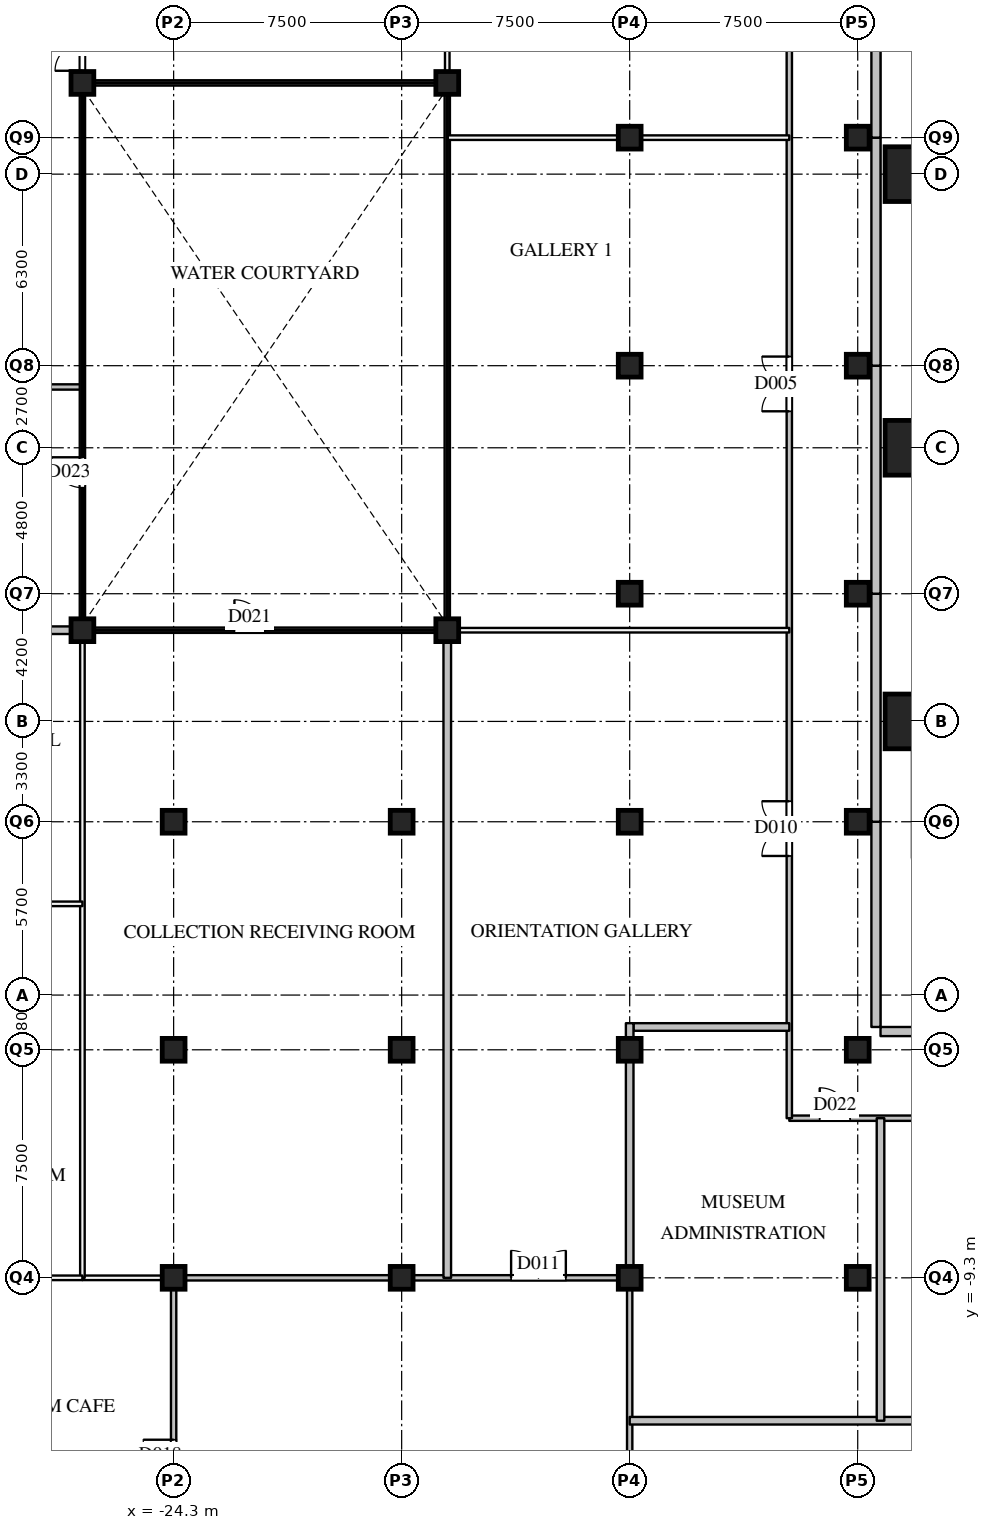
"""IFC4 building model, lengths in metres.
Left out: names, types, materials, properties, quantities, classifications, styles, units other than length and angle.
Written with IfcOpenShell. Run it as: python <this file> out.ifc"""

import sys

from ifc_helpers import new_model, si_unit, direction, frame, frame_2d, origin, origin_2d, place, context, subcontext, project, spatial, rectangle, extrude, element, fill, save


model = new_model("IFC4")
c1 = context("Model", 3, precision=1e-05, world=origin(), true_north=direction((0.0, 1.0)))
c2 = subcontext(c1, "Body", "Model", "MODEL_VIEW")
j1 = project(units=[si_unit("LENGTHUNIT", "METRE"), si_unit("PLANEANGLEUNIT", "RADIAN")], contexts=[c1])
p1 = place(None, origin())
s1 = spatial("IfcSite", under=j1, at=p1, CompositionType="ELEMENT")
p2 = place(p1, origin())
s2 = spatial("IfcBuilding", under=s1, at=p2, CompositionType="ELEMENT")
p3 = place(p2, origin())
s3 = spatial("IfcBuildingStorey", under=s2, at=p3, CompositionType="ELEMENT", Elevation=0.0)
for number, where, z_axis, x_axis in (
    (1, (0.0, 9.0, 0.0), (0.0, 0.0, 1.0), (1.0, 0.0, 0.0)),
    (2, (0.0, 18.0, 0.0), (0.0, 0.0, 1.0), (1.0, 0.0, 0.0)),
    (3, (0.0, 27.0, 0.0), (0.0, 0.0, 1.0), (1.0, 0.0, 0.0)),
):
    element("IfcColumn", number, at=place(p3, frame(where, z_axis=z_axis, x_axis=x_axis)), inside=s3, PredefinedType="COLUMN", context=c2, shape_type="SweptSolid", body=[
        extrude(rectangle(XDim=1.8, YDim=1.8, at=origin_2d()), origin(), (0.0, 0.0, 1.0), 8.0),
    ])
for number, where, z_axis, x_axis in (
    (4, (-24.3, -9.3, 0.0), (0.0, 0.0, 1.0), (1.0, 0.0, 0.0)),
    (5, (-24.3, -1.8, 0.0), (0.0, 0.0, 1.0), (1.0, 0.0, 0.0)),
    (6, (-24.3, 5.7, 0.0), (0.0, 0.0, 1.0), (1.0, 0.0, 0.0)),
    (7, (-16.8, -9.3, 0.0), (0.0, 0.0, 1.0), (1.0, 0.0, 0.0)),
    (8, (-16.8, -1.8, 0.0), (0.0, 0.0, 1.0), (1.0, 0.0, 0.0)),
    (9, (-16.8, 5.7, 0.0), (0.0, 0.0, 1.0), (1.0, 0.0, 0.0)),
    (10, (-9.3, -9.3, 0.0), (0.0, 0.0, 1.0), (1.0, 0.0, 0.0)),
    (11, (-9.3, -1.8, 0.0), (0.0, 0.0, 1.0), (1.0, 0.0, 0.0)),
    (12, (-9.3, 5.7, 0.0), (0.0, 0.0, 1.0), (1.0, 0.0, 0.0)),
    (13, (-9.3, 13.2, 0.0), (0.0, 0.0, 1.0), (1.0, 0.0, 0.0)),
    (14, (-9.3, 20.7, 0.0), (0.0, 0.0, 1.0), (1.0, 0.0, 0.0)),
    (15, (-9.3, 28.2, 0.0), (0.0, 0.0, 1.0), (1.0, 0.0, 0.0)),
    (16, (-1.8, -9.3, 0.0), (0.0, 0.0, 1.0), (1.0, 0.0, 0.0)),
    (17, (-1.8, -1.8, 0.0), (0.0, 0.0, 1.0), (1.0, 0.0, 0.0)),
    (18, (-1.8, 5.7, 0.0), (0.0, 0.0, 1.0), (1.0, 0.0, 0.0)),
    (19, (-1.8, 13.2, 0.0), (0.0, 0.0, 1.0), (1.0, 0.0, 0.0)),
    (20, (-1.8, 20.7, 0.0), (0.0, 0.0, 1.0), (1.0, 0.0, 0.0)),
    (21, (-1.8, 28.2, 0.0), (0.0, 0.0, 1.0), (1.0, 0.0, 0.0)),
    (22, (-27.3, 12.0, 0.0), (0.0, 0.0, 1.0), (1.0, 0.0, 0.0)),
    (23, (-15.3, 12.0, 0.0), (0.0, 0.0, 1.0), (1.0, 0.0, 0.0)),
    (24, (-15.3, 30.0, 0.0), (0.0, 0.0, 1.0), (1.0, 0.0, 0.0)),
    (25, (-27.3, 30.0, 0.0), (0.0, 0.0, 1.0), (1.0, 0.0, 0.0)),
):
    element("IfcColumn", number, at=place(p3, frame(where, z_axis=z_axis, x_axis=x_axis)), inside=s3, PredefinedType="COLUMN", context=c2, shape_type="SweptSolid", body=[
        extrude(rectangle(XDim=0.75, YDim=0.75, at=origin_2d()), origin(), (0.0, 0.0, 1.0), 8.0),
    ])
for number, where, z_axis, x_axis in (
    (26, (5.7, -1.2, 0.0), (0.0, 0.0, 1.0), (-1.0, 0.0, 0.0)),
    (27, (-1.2, -1.05, 0.0), (0.0, 0.0, 1.0), (0.0, 1.0, 0.0)),
):
    element("IfcWall", number, at=place(p3, frame(where, z_axis=z_axis, x_axis=x_axis)), inside=s3, PredefinedType="SOLIDWALL", context=c2, shape_type="SweptSolid", body=[
        extrude(rectangle(XDim=6.75, YDim=0.3, at=frame_2d((3.375, 0.0))), origin(), (0.0, 0.0, 1.0), 7.59),
    ])
for number, where, z_axis, x_axis in (
    (28, (-1.2, 5.7, 0.0), (0.0, 0.0, 1.0), (0.0, 1.0, 0.0)),
    (29, (-1.2, 13.2, 0.0), (0.0, 0.0, 1.0), (0.0, 1.0, 0.0)),
    (30, (-1.2, 20.7, 0.0), (0.0, 0.0, 1.0), (0.0, 1.0, 0.0)),
    (31, (-1.2, 28.2, 0.0), (0.0, 0.0, 1.0), (0.0, 1.0, 0.0)),
):
    element("IfcWall", number, at=place(p3, frame(where, z_axis=z_axis, x_axis=x_axis)), inside=s3, PredefinedType="SOLIDWALL", context=c2, shape_type="SweptSolid", body=[
        extrude(rectangle(XDim=7.5, YDim=0.3, at=frame_2d((3.75, 0.0))), origin(), (0.0, 0.0, 1.0), 7.59),
    ])
p4 = place(p3, frame((-24.3, -9.3, 0.0), z_axis=(0.0, 0.0, 1.0), x_axis=(1.0, 0.0, 0.0)))
e32 = element("IfcWall", 32, at=p4, inside=s3, PredefinedType="PARTITIONING", context=c2, shape_type="SweptSolid", body=[
    extrude(rectangle(XDim=15.0, YDim=0.175, at=frame_2d((7.5, 0.0))), origin(), (0.0, 0.0, 1.0), 6.79),
])
p5 = place(p4, frame((11.1, 0.0, 0.0)))
e33 = element("IfcOpeningElement", 33, at=p5, cuts=e32, PredefinedType="OPENING", context=c2, shape_type="SweptSolid", body=[
    extrude(rectangle(XDim=1.8, YDim=2.1, at=frame_2d((0.9, 1.05))), frame((0.0, 0.097, 0.0), z_axis=(0.0, -1.0, 0.0), x_axis=(1.0, 0.0, 0.0)), (0.0, 0.0, 1.0), 0.195),
])
p6 = place(p3, frame((-4.05, -4.05, 0.0), z_axis=(0.0, 0.0, 1.0), x_axis=(1.0, 0.0, 0.0)))
e34 = element("IfcWall", 34, at=p6, inside=s3, PredefinedType="PARTITIONING", context=c2, shape_type="SweptSolid", body=[
    extrude(rectangle(XDim=18.0, YDim=0.175, at=frame_2d((9.0, 0.0))), origin(), (0.0, 0.0, 1.0), 6.79),
])
p7 = place(p6, frame((1.0, 0.0, 0.0)))
e35 = element("IfcOpeningElement", 35, at=p7, cuts=e34, PredefinedType="OPENING", context=c2, shape_type="SweptSolid", body=[
    extrude(rectangle(XDim=1.0, YDim=2.1, at=frame_2d((0.5, 1.05))), frame((0.0, 0.097, 0.0), z_axis=(0.0, -1.0, 0.0), x_axis=(1.0, 0.0, 0.0)), (0.0, 0.0, 1.0), 0.195),
])
p8 = place(p6, frame((10.0, 0.0, 0.0)))
e36 = element("IfcOpeningElement", 36, at=p8, cuts=e34, PredefinedType="OPENING", context=c2, shape_type="SweptSolid", body=[
    extrude(rectangle(XDim=1.0, YDim=2.1, at=frame_2d((0.5, 1.05))), frame((0.0, 0.097, 0.0), z_axis=(0.0, -1.0, 0.0), x_axis=(1.0, 0.0, 0.0)), (0.0, 0.0, 1.0), 0.195),
])
p9 = place(p3, frame((-27.3, 12.0, 0.0), z_axis=(0.0, 0.0, 1.0), x_axis=(1.0, 0.0, 0.0)))
e37 = element("IfcWall", 37, at=p9, inside=s3, PredefinedType="PARTITIONING", context=c2, shape_type="SweptSolid", body=[
    extrude(rectangle(XDim=12.0, YDim=0.175, at=frame_2d((6.0, 0.0))), origin(), (0.0, 0.0, 1.0), 7.59),
])
p10 = place(p9, frame((5.0, 0.0, 0.0)))
e38 = element("IfcOpeningElement", 38, at=p10, cuts=e37, PredefinedType="OPENING", context=c2, shape_type="SweptSolid", body=[
    extrude(rectangle(XDim=1.0, YDim=2.1, at=frame_2d((0.5, 1.05))), frame((0.0, 0.097, 0.0), z_axis=(0.0, -1.0, 0.0), x_axis=(1.0, 0.0, 0.0)), (0.0, 0.0, 1.0), 0.195),
])
p11 = place(p3, frame((-30.0, 20.0, 0.0), z_axis=(0.0, 0.0, 1.0), x_axis=(1.0, 0.0, 0.0)))
e39 = element("IfcWall", 39, at=p11, inside=s3, PredefinedType="PARTITIONING", context=c2, shape_type="SweptSolid", body=[
    extrude(rectangle(XDim=2.7, YDim=0.175, at=frame_2d((1.35, 0.0))), origin(), (0.0, 0.0, 1.0), 7.59),
])
p12 = place(p3, frame((-27.3, 30.0, 0.0), z_axis=(0.0, 0.0, 1.0), x_axis=(1.0, 0.0, 0.0)))
e40 = element("IfcWall", 40, at=p12, inside=s3, PredefinedType="PARTITIONING", context=c2, shape_type="SweptSolid", body=[
    extrude(rectangle(XDim=12.0, YDim=0.175, at=frame_2d((6.0, 0.0))), origin(), (0.0, 0.0, 1.0), 7.59),
])
p13 = place(p3, frame((-27.3, 12.0, 0.0), z_axis=(0.0, 0.0, 1.0), x_axis=(0.0, 1.0, 0.0)))
e41 = element("IfcWall", 41, at=p13, inside=s3, PredefinedType="PARTITIONING", context=c2, shape_type="SweptSolid", body=[
    extrude(rectangle(XDim=35.35, YDim=0.175, at=frame_2d((17.675, 0.0))), origin(), (0.0, 0.0, 1.0), 6.79),
])
p14 = place(p13, frame((18.4, 0.0, 0.0)))
e42 = element("IfcOpeningElement", 42, at=p14, cuts=e41, PredefinedType="OPENING", context=c2, shape_type="SweptSolid", body=[
    extrude(rectangle(XDim=1.8, YDim=2.1, at=frame_2d((0.9, 1.05))), frame((0.0, 0.097, 0.0), z_axis=(0.0, -1.0, 0.0), x_axis=(1.0, 0.0, 0.0)), (0.0, 0.0, 1.0), 0.195),
])
p15 = place(p13, frame((23.7, 0.0, 0.0)))
e43 = element("IfcOpeningElement", 43, at=p15, cuts=e41, PredefinedType="OPENING", context=c2, shape_type="SweptSolid", body=[
    extrude(rectangle(XDim=1.8, YDim=2.1, at=frame_2d((0.9, 1.05))), frame((0.0, 0.097, 0.0), z_axis=(0.0, -1.0, 0.0), x_axis=(1.0, 0.0, 0.0)), (0.0, 0.0, 1.0), 0.195),
])
p16 = place(p13, frame((4.688, 0.0, 0.0)))
e44 = element("IfcOpeningElement", 44, at=p16, cuts=e41, PredefinedType="OPENING", context=c2, shape_type="SweptSolid", body=[
    extrude(rectangle(XDim=1.0, YDim=2.1, at=frame_2d((0.5, 1.05))), frame((0.0, 0.097, 0.0), z_axis=(0.0, -1.0, 0.0), x_axis=(1.0, 0.0, 0.0)), (0.0, 0.0, 1.0), 0.195),
])
p17 = place(p3, frame((-24.3, -20.95, 0.0), z_axis=(0.0, 0.0, 1.0), x_axis=(0.0, 1.0, 0.0)))
e45 = element("IfcWall", 45, at=p17, inside=s3, PredefinedType="PARTITIONING", context=c2, shape_type="SweptSolid", body=[
    extrude(rectangle(XDim=11.65, YDim=0.175, at=frame_2d((5.825, 0.0))), origin(), (0.0, 0.0, 1.0), 6.79),
])
p18 = place(p17, frame((5.325, 0.0, 0.0)))
e46 = element("IfcOpeningElement", 46, at=p18, cuts=e45, PredefinedType="OPENING", context=c2, shape_type="SweptSolid", body=[
    extrude(rectangle(XDim=1.0, YDim=2.1, at=frame_2d((0.5, 1.05))), frame((0.0, 0.097, 0.0), z_axis=(0.0, -1.0, 0.0), x_axis=(1.0, 0.0, 0.0)), (0.0, 0.0, 1.0), 0.195),
])
p19 = place(p3, frame((-15.3, 12.0, 0.0), z_axis=(0.0, 0.0, 1.0), x_axis=(0.0, 1.0, 0.0)))
e47 = element("IfcWall", 47, at=p19, inside=s3, PredefinedType="PARTITIONING", context=c2, shape_type="SweptSolid", body=[
    extrude(rectangle(XDim=18.0, YDim=0.175, at=frame_2d((9.0, 0.0))), origin(), (0.0, 0.0, 1.0), 7.59),
])
p20 = place(p3, frame((-9.3, -32.55, 0.0), z_axis=(0.0, 0.0, 1.0), x_axis=(0.0, 1.0, 0.0)))
e48 = element("IfcWall", 48, at=p20, inside=s3, PredefinedType="PARTITIONING", context=c2, shape_type="SweptSolid", body=[
    extrude(rectangle(XDim=23.25, YDim=0.175, at=frame_2d((11.625, 0.0))), origin(), (0.0, 0.0, 1.0), 6.79),
])
p21 = place(p3, frame((-4.05, -4.05, 0.0), z_axis=(0.0, 0.0, 1.0), x_axis=(0.0, 1.0, 0.0)))
e49 = element("IfcWall", 49, at=p21, inside=s3, PredefinedType="PARTITIONING", context=c2, shape_type="SweptSolid", body=[
    extrude(rectangle(XDim=63.0, YDim=0.175, at=frame_2d((31.5, 0.0))), origin(), (0.0, 0.0, 1.0), 6.79),
])
p22 = place(p21, frame((51.535, 0.0, 0.0)))
e50 = element("IfcOpeningElement", 50, at=p22, cuts=e49, PredefinedType="OPENING", context=c2, shape_type="SweptSolid", body=[
    extrude(rectangle(XDim=1.8, YDim=2.1, at=frame_2d((0.9, 1.05))), frame((0.0, 0.097, 0.0), z_axis=(0.0, -1.0, 0.0), x_axis=(1.0, 0.0, 0.0)), (0.0, 0.0, 1.0), 0.195),
])
p23 = place(p21, frame((23.25, 0.0, 0.0)))
e51 = element("IfcOpeningElement", 51, at=p23, cuts=e49, PredefinedType="OPENING", context=c2, shape_type="SweptSolid", body=[
    extrude(rectangle(XDim=1.8, YDim=2.1, at=frame_2d((0.9, 1.05))), frame((0.0, 0.097, 0.0), z_axis=(0.0, -1.0, 0.0), x_axis=(1.0, 0.0, 0.0)), (0.0, 0.0, 1.0), 0.195),
])
p24 = place(p21, frame((38.85, 0.0, 0.0)))
e52 = element("IfcOpeningElement", 52, at=p24, cuts=e49, PredefinedType="OPENING", context=c2, shape_type="SweptSolid", body=[
    extrude(rectangle(XDim=1.8, YDim=2.1, at=frame_2d((0.9, 1.05))), frame((0.0, 0.097, 0.0), z_axis=(0.0, -1.0, 0.0), x_axis=(1.0, 0.0, 0.0)), (0.0, 0.0, 1.0), 0.195),
])
p25 = place(p21, frame((8.625, 0.0, 0.0)))
e53 = element("IfcOpeningElement", 53, at=p25, cuts=e49, PredefinedType="OPENING", context=c2, shape_type="SweptSolid", body=[
    extrude(rectangle(XDim=1.8, YDim=2.1, at=frame_2d((0.9, 1.05))), frame((0.0, 0.097, 0.0), z_axis=(0.0, -1.0, 0.0), x_axis=(1.0, 0.0, 0.0)), (0.0, 0.0, 1.0), 0.195),
])
p26 = place(p3, frame((-27.3, -9.3, 0.0), z_axis=(0.0, 0.0, 1.0), x_axis=(1.0, 0.0, 0.0)))
e54 = element("IfcWall", 54, at=p26, inside=s3, PredefinedType="PARTITIONING", context=c2, shape_type="SweptSolid", body=[
    extrude(rectangle(XDim=3.0, YDim=0.15, at=frame_2d((1.5, 0.0))), origin(), (0.0, 0.0, 1.0), 6.79),
])
for number, where, z_axis, x_axis in (
    (55, (-15.3, 12.0, 0.0), (0.0, 0.0, 1.0), (1.0, 0.0, 0.0)),
    (56, (-15.3, 28.2, 0.0), (0.0, 0.0, 1.0), (1.0, 0.0, 0.0)),
):
    element("IfcWall", number, at=place(p3, frame(where, z_axis=z_axis, x_axis=x_axis)), inside=s3, PredefinedType="PARTITIONING", context=c2, shape_type="SweptSolid", body=[
        extrude(rectangle(XDim=11.25, YDim=0.15, at=frame_2d((5.625, 0.0))), origin(), (0.0, 0.0, 1.0), 6.79),
    ])
p27 = place(p3, frame((-27.3, -9.3, 0.0), z_axis=(0.0, 0.0, 1.0), x_axis=(0.0, 1.0, 0.0)))
e57 = element("IfcWall", 57, at=p27, inside=s3, PredefinedType="PARTITIONING", context=c2, shape_type="SweptSolid", body=[
    extrude(rectangle(XDim=21.3, YDim=0.15, at=frame_2d((10.65, 0.0))), origin(), (0.0, 0.0, 1.0), 6.79),
])
p28 = place(p3, frame((-15.3, 30.0, 0.0), z_axis=(0.0, 0.0, 1.0), x_axis=(0.0, 1.0, 0.0)))
e58 = element("IfcWall", 58, at=p28, inside=s3, PredefinedType="PARTITIONING", context=c2, shape_type="SweptSolid", body=[
    extrude(rectangle(XDim=13.2, YDim=0.15, at=frame_2d((6.6, 0.0))), origin(), (0.0, 0.0, 1.0), 6.79),
])
p29 = place(p28, frame((3.52, 0.0, 0.0)))
e59 = element("IfcOpeningElement", 59, at=p29, cuts=e58, PredefinedType="OPENING", context=c2, shape_type="SweptSolid", body=[
    extrude(rectangle(XDim=1.8, YDim=2.1, at=frame_2d((0.9, 1.05))), frame((0.0, 0.085, 0.0), z_axis=(0.0, -1.0, 0.0), x_axis=(1.0, 0.0, 0.0)), (0.0, 0.0, 1.0), 0.17),
])
p30 = place(p3, frame((-32.55, -9.3, 0.0), z_axis=(0.0, 0.0, 1.0), x_axis=(1.0, 0.0, 0.0)))
e60 = element("IfcWall", 60, at=p30, inside=s3, PredefinedType="PARTITIONING", context=c2, shape_type="SweptSolid", body=[
    extrude(rectangle(XDim=5.25, YDim=0.15, at=frame_2d((2.625, 0.0))), origin(), (0.0, 0.0, 1.0), 6.79),
])
p31 = place(p30, frame((2.125, 0.0, 0.0)))
e61 = element("IfcOpeningElement", 61, at=p31, cuts=e60, PredefinedType="OPENING", context=c2, shape_type="SweptSolid", body=[
    extrude(rectangle(XDim=1.0, YDim=2.1, at=frame_2d((0.5, 1.05))), frame((0.0, 0.085, 0.0), z_axis=(0.0, -1.0, 0.0), x_axis=(1.0, 0.0, 0.0)), (0.0, 0.0, 1.0), 0.17),
])
p32 = place(p3, frame((-32.55, 3.0, 0.0), z_axis=(0.0, 0.0, 1.0), x_axis=(1.0, 0.0, 0.0)))
e62 = element("IfcWall", 62, at=p32, inside=s3, PredefinedType="PARTITIONING", context=c2, shape_type="SweptSolid", body=[
    extrude(rectangle(XDim=5.25, YDim=0.15, at=frame_2d((2.625, 0.0))), origin(), (0.0, 0.0, 1.0), 6.79),
])
p33 = place(p32, frame((2.125, 0.0, 0.0)))
e63 = element("IfcOpeningElement", 63, at=p33, cuts=e62, PredefinedType="OPENING", context=c2, shape_type="SweptSolid", body=[
    extrude(rectangle(XDim=1.0, YDim=2.1, at=frame_2d((0.5, 1.05))), frame((0.0, 0.085, 0.0), z_axis=(0.0, -1.0, 0.0), x_axis=(1.0, 0.0, 0.0)), (0.0, 0.0, 1.0), 0.17),
])
p34 = place(p3, frame((-9.3, -14.0, 0.0), z_axis=(0.0, 0.0, 1.0), x_axis=(1.0, 0.0, 0.0)))
e64 = element("IfcWall", 64, at=p34, inside=s3, PredefinedType="PARTITIONING", context=c2, shape_type="SweptSolid", body=[
    extrude(rectangle(XDim=13.425, YDim=0.25, at=frame_2d((6.712, 0.0))), origin(), (0.0, 0.0, 1.0), 6.79),
])
p35 = place(p3, frame((-9.175, -1.05, 0.0), z_axis=(0.0, 0.0, 1.0), x_axis=(1.0, 0.0, 0.0)))
e65 = element("IfcWall", 65, at=p35, inside=s3, PredefinedType="PARTITIONING", context=c2, shape_type="SweptSolid", body=[
    extrude(rectangle(XDim=5.125, YDim=0.25, at=frame_2d((2.562, 0.0))), origin(), (0.0, 0.0, 1.0), 6.79),
])
p36 = place(p3, frame((-32.55, 12.0, 0.0), z_axis=(0.0, 0.0, 1.0), x_axis=(1.0, 0.0, 0.0)))
e66 = element("IfcWall", 66, at=p36, inside=s3, PredefinedType="PARTITIONING", context=c2, shape_type="SweptSolid", body=[
    extrude(rectangle(XDim=5.25, YDim=0.25, at=frame_2d((2.625, 0.0))), origin(), (0.0, 0.0, 1.0), 6.79),
])
p37 = place(p3, frame((-15.3, -9.3, 0.0), z_axis=(0.0, 0.0, 1.0), x_axis=(0.0, 1.0, 0.0)))
e67 = element("IfcWall", 67, at=p37, inside=s3, PredefinedType="PARTITIONING", context=c2, shape_type="SweptSolid", body=[
    extrude(rectangle(XDim=21.3, YDim=0.25, at=frame_2d((10.65, 0.0))), origin(), (0.0, 0.0, 1.0), 6.79),
])
p38 = place(p3, frame((-9.3, -9.3, 0.0), z_axis=(0.0, 0.0, 1.0), x_axis=(0.0, 1.0, 0.0)))
e68 = element("IfcWall", 68, at=p38, inside=s3, PredefinedType="PARTITIONING", context=c2, shape_type="SweptSolid", body=[
    extrude(rectangle(XDim=8.375, YDim=0.25, at=frame_2d((4.188, 0.0))), origin(), (0.0, 0.0, 1.0), 6.79),
])
p39 = place(p3, frame((-1.05, -14.0, 0.0), z_axis=(0.0, 0.0, 1.0), x_axis=(0.0, 1.0, 0.0)))
e69 = element("IfcWall", 69, at=p39, inside=s3, PredefinedType="PARTITIONING", context=c2, shape_type="SweptSolid", body=[
    extrude(rectangle(XDim=9.95, YDim=0.25, at=frame_2d((4.975, 0.0))), origin(), (0.0, 0.0, 1.0), 6.79),
])
p40 = place(p14, origin())
e70 = element("IfcDoor", 70, at=p40, inside=s3, OperationType="DOUBLE_DOOR_SINGLE_SWING", PredefinedType="DOOR", context=c2, shape_type="SweptSolid", body=[
    extrude(rectangle(XDim=1.8, YDim=2.1, at=frame_2d((0.9, 1.05))), frame((0.0, 0.025, 0.0), z_axis=(0.0, -1.0, 0.0), x_axis=(1.0, 0.0, 0.0)), (0.0, 0.0, 1.0), 0.05),
])
fill(e42, e70)
p41 = place(p23, origin())
e71 = element("IfcDoor", 71, at=p41, inside=s3, OperationType="DOUBLE_DOOR_SINGLE_SWING", PredefinedType="DOOR", context=c2, shape_type="SweptSolid", body=[
    extrude(rectangle(XDim=1.8, YDim=2.1, at=frame_2d((0.9, 1.05))), frame((0.0, 0.025, 0.0), z_axis=(0.0, -1.0, 0.0), x_axis=(1.0, 0.0, 0.0)), (0.0, 0.0, 1.0), 0.05),
])
fill(e51, e71)
p42 = place(p25, origin())
e72 = element("IfcDoor", 72, at=p42, inside=s3, OperationType="DOUBLE_DOOR_SINGLE_SWING", PredefinedType="DOOR", context=c2, shape_type="SweptSolid", body=[
    extrude(rectangle(XDim=1.8, YDim=2.1, at=frame_2d((0.9, 1.05))), frame((0.0, 0.025, 0.0), z_axis=(0.0, -1.0, 0.0), x_axis=(1.0, 0.0, 0.0)), (0.0, 0.0, 1.0), 0.05),
])
fill(e53, e72)
p43 = place(p5, origin())
e73 = element("IfcDoor", 73, at=p43, inside=s3, OperationType="DOUBLE_DOOR_SINGLE_SWING", PredefinedType="DOOR", context=c2, shape_type="SweptSolid", body=[
    extrude(rectangle(XDim=1.8, YDim=2.1, at=frame_2d((0.9, 1.05))), frame((0.0, 0.025, 0.0), z_axis=(0.0, -1.0, 0.0), x_axis=(1.0, 0.0, 0.0)), (0.0, 0.0, 1.0), 0.05),
])
fill(e33, e73)
p44 = place(p18, origin())
e74 = element("IfcDoor", 74, at=p44, inside=s3, OperationType="SINGLE_SWING_RIGHT", PredefinedType="DOOR", context=c2, shape_type="SweptSolid", body=[
    extrude(rectangle(XDim=1.0, YDim=2.1, at=frame_2d((0.5, 1.05))), frame((0.0, 0.025, 0.0), z_axis=(0.0, -1.0, 0.0), x_axis=(1.0, 0.0, 0.0)), (0.0, 0.0, 1.0), 0.05),
])
fill(e46, e74)
p45 = place(p10, origin())
e75 = element("IfcDoor", 75, at=p45, inside=s3, OperationType="SINGLE_SWING_LEFT", PredefinedType="DOOR", context=c2, shape_type="SweptSolid", body=[
    extrude(rectangle(XDim=1.0, YDim=2.1, at=frame_2d((0.5, 1.05))), frame((0.0, 0.025, 0.0), z_axis=(0.0, -1.0, 0.0), x_axis=(1.0, 0.0, 0.0)), (0.0, 0.0, 1.0), 0.05),
])
fill(e38, e75)
p46 = place(p7, origin())
e76 = element("IfcDoor", 76, at=p46, inside=s3, OperationType="SINGLE_SWING_LEFT", PredefinedType="DOOR", context=c2, shape_type="SweptSolid", body=[
    extrude(rectangle(XDim=1.0, YDim=2.1, at=frame_2d((0.5, 1.05))), frame((0.0, 0.025, 0.0), z_axis=(0.0, -1.0, 0.0), x_axis=(1.0, 0.0, 0.0)), (0.0, 0.0, 1.0), 0.05),
])
fill(e35, e76)
p47 = place(p16, origin())
e77 = element("IfcDoor", 77, at=p47, inside=s3, OperationType="SINGLE_SWING_RIGHT", PredefinedType="DOOR", context=c2, shape_type="SweptSolid", body=[
    extrude(rectangle(XDim=1.0, YDim=2.1, at=frame_2d((0.5, 1.05))), frame((0.0, 0.025, 0.0), z_axis=(0.0, -1.0, 0.0), x_axis=(1.0, 0.0, 0.0)), (0.0, 0.0, 1.0), 0.05),
])
fill(e44, e77)
save(model, sys.argv[1])
